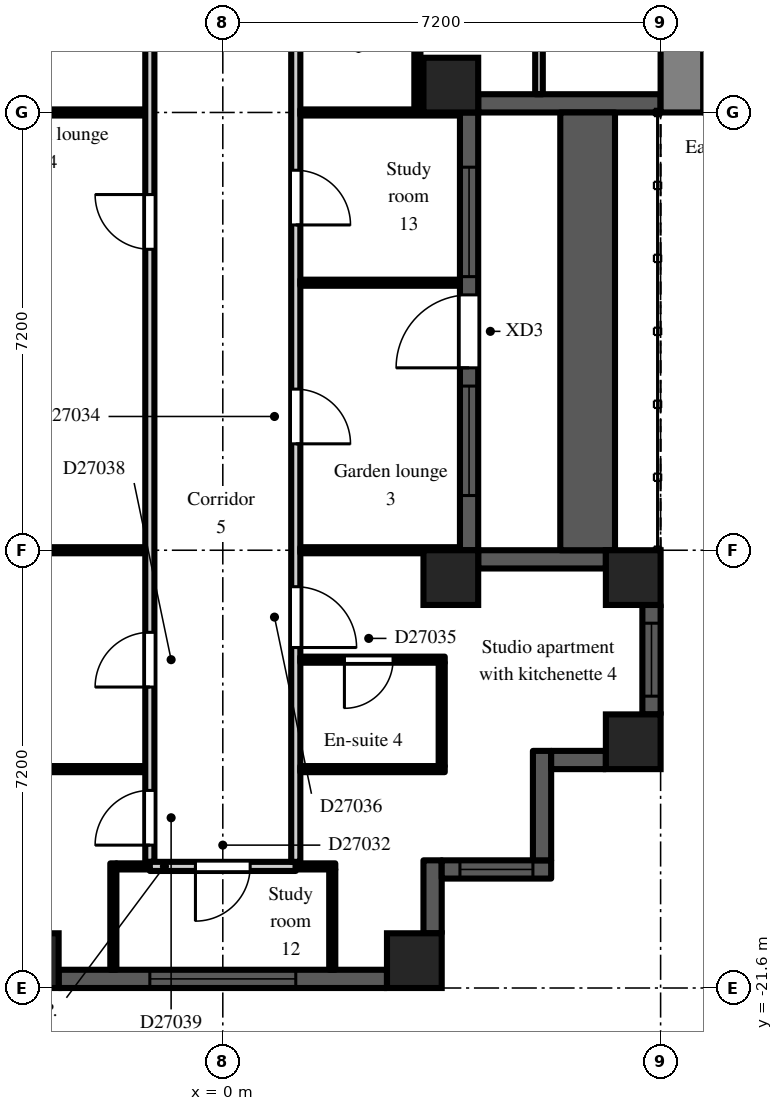
"""IFC4 building model, lengths in metres.
Left out: names, types, materials, properties, quantities, classifications, styles, units other than length and angle.
Written with IfcOpenShell. Run it as: python <this file> out.ifc"""

import sys

from ifc_helpers import new_model, si_unit, direction, frame, frame_2d, origin, origin_2d, place, context, subcontext, project, spatial, rectangle, extrude, element, fill, save


model = new_model("IFC4")
c1 = context("Model", 3, precision=1e-05, world=origin(), true_north=direction((0.0, 1.0)))
c2 = subcontext(c1, "Body", "Model", "MODEL_VIEW")
j1 = project(units=[si_unit("LENGTHUNIT", "METRE"), si_unit("PLANEANGLEUNIT", "RADIAN")], contexts=[c1])
p1 = place(None, origin())
s1 = spatial("IfcSite", under=j1, at=p1, CompositionType="ELEMENT")
p2 = place(p1, origin())
s2 = spatial("IfcBuilding", under=s1, at=p2, CompositionType="ELEMENT")
p3 = place(p2, frame((0.0, 0.0, 191.7)))
s3 = spatial("IfcBuildingStorey", under=s2, at=p3, CompositionType="ELEMENT", Elevation=191.7)
for number, where, z_axis, x_axis in (
    (1, (-3.15, -21.15, 0.0), (0.0, 0.0, 1.0), (1.0, 0.0, 0.0)),
    (2, (3.15, -21.15, 0.0), (0.0, 0.0, 1.0), (1.0, 0.0, 0.0)),
    (3, (3.75, -14.85, 0.0), (0.0, 0.0, 1.0), (1.0, 0.0, 0.0)),
    (4, (3.75, -6.75, 0.0), (0.0, 0.0, 1.0), (1.0, 0.0, 0.0)),
    (5, (6.75, -17.55, 0.0), (0.0, 0.0, 1.0), (1.0, 0.0, 0.0)),
    (6, (6.75, -14.85, 0.0), (0.0, 0.0, 1.0), (1.0, 0.0, 0.0)),
):
    element("IfcColumn", number, at=place(p3, frame(where, z_axis=z_axis, x_axis=x_axis)), inside=s3, PredefinedType="COLUMN", context=c2, shape_type="SweptSolid", body=[
        extrude(rectangle(XDim=0.9, YDim=0.9, at=origin_2d()), origin(), (0.0, 0.0, 1.0), 3.0),
    ])
p4 = place(p3, frame((-2.7, -21.45, 0.0), z_axis=(0.0, 0.0, 1.0), x_axis=(1.0, 0.0, 0.0)))
e7 = element("IfcWall", 7, at=p4, inside=s3, PredefinedType="SOLIDWALL", context=c2, shape_type="SweptSolid", body=[
    extrude(rectangle(XDim=5.4, YDim=0.3, at=frame_2d((2.7, 0.0))), origin(), (0.0, 0.0, 1.0), 2.3),
])
p5 = place(p4, frame((1.5, 0.0, 0.2)))
e8 = element("IfcOpeningElement", 8, at=p5, cuts=e7, PredefinedType="OPENING", context=c2, shape_type="SweptSolid", body=[
    extrude(rectangle(XDim=2.4, YDim=1.85, at=frame_2d((1.2, 0.925))), frame((0.0, 0.16, 0.0), z_axis=(0.0, -1.0, 0.0), x_axis=(1.0, 0.0, 0.0)), (0.0, 0.0, 1.0), 0.32),
])
p6 = place(p3, frame((3.45, -20.7, 0.0), z_axis=(0.0, 0.0, 1.0), x_axis=(0.0, 1.0, 0.0)))
e9 = element("IfcWall", 9, at=p6, inside=s3, PredefinedType="SOLIDWALL", context=c2, shape_type="SweptSolid", body=[
    extrude(rectangle(XDim=1.2, YDim=0.3, at=frame_2d((0.6, 0.0))), origin(), (0.0, 0.0, 1.0), 2.55),
])
p7 = place(p3, frame((3.6, -19.65, 0.0), z_axis=(0.0, 0.0, 1.0), x_axis=(1.0, 0.0, 0.0)))
e10 = element("IfcWall", 10, at=p7, inside=s3, PredefinedType="SOLIDWALL", context=c2, shape_type="SweptSolid", body=[
    extrude(rectangle(XDim=1.8, YDim=0.3, at=frame_2d((0.9, 0.0))), origin(), (0.0, 0.0, 1.0), 2.55),
])
p8 = place(p7, frame((0.3, 0.0, 0.2)))
e11 = element("IfcOpeningElement", 11, at=p8, cuts=e10, PredefinedType="OPENING", context=c2, shape_type="SweptSolid", body=[
    extrude(rectangle(XDim=1.2, YDim=1.85, at=frame_2d((0.6, 0.925))), frame((0.0, 0.16, 0.0), z_axis=(0.0, -1.0, 0.0), x_axis=(1.0, 0.0, 0.0)), (0.0, 0.0, 1.0), 0.32),
])
p9 = place(p3, frame((5.25, -19.5, 0.0), z_axis=(0.0, 0.0, 1.0), x_axis=(0.0, 1.0, 0.0)))
e12 = element("IfcWall", 12, at=p9, inside=s3, PredefinedType="SOLIDWALL", context=c2, shape_type="SweptSolid", body=[
    extrude(rectangle(XDim=1.8, YDim=0.3, at=frame_2d((0.9, 0.0))), origin(), (0.0, 0.0, 1.0), 2.55),
])
p10 = place(p3, frame((5.4, -17.85, 0.0), z_axis=(0.0, 0.0, 1.0), x_axis=(1.0, 0.0, 0.0)))
e13 = element("IfcWall", 13, at=p10, inside=s3, PredefinedType="SOLIDWALL", context=c2, shape_type="SweptSolid", body=[
    extrude(rectangle(XDim=0.9, YDim=0.3, at=frame_2d((0.45, 0.0))), origin(), (0.0, 0.0, 1.0), 2.55),
])
p11 = place(p3, frame((7.05, -17.1, 0.0), z_axis=(0.0, 0.0, 1.0), x_axis=(0.0, 1.0, 0.0)))
e14 = element("IfcWall", 14, at=p11, inside=s3, PredefinedType="SOLIDWALL", context=c2, shape_type="SweptSolid", body=[
    extrude(rectangle(XDim=1.8, YDim=0.3, at=frame_2d((0.9, 0.0))), origin(), (0.0, 0.0, 1.0), 2.3),
])
p12 = place(p11, frame((0.3, 0.0, 0.2)))
e15 = element("IfcOpeningElement", 15, at=p12, cuts=e14, PredefinedType="OPENING", context=c2, shape_type="SweptSolid", body=[
    extrude(rectangle(XDim=1.2, YDim=1.85, at=frame_2d((0.6, 0.925))), frame((0.0, 0.16, 0.0), z_axis=(0.0, -1.0, 0.0), x_axis=(1.0, 0.0, 0.0)), (0.0, 0.0, 1.0), 0.32),
])
p13 = place(p3, frame((6.3, -14.55, 0.0), z_axis=(0.0, 0.0, 1.0), x_axis=(-1.0, 0.0, 0.0)))
e16 = element("IfcWall", 16, at=p13, inside=s3, PredefinedType="SOLIDWALL", context=c2, shape_type="SweptSolid", body=[
    extrude(rectangle(XDim=2.1, YDim=0.3, at=frame_2d((1.05, 0.0))), origin(), (0.0, 0.0, 1.0), 2.55),
])
p14 = place(p3, frame((4.05, -14.4, 0.0), z_axis=(0.0, 0.0, 1.0), x_axis=(0.0, 1.0, 0.0)))
e17 = element("IfcWall", 17, at=p14, inside=s3, PredefinedType="SOLIDWALL", context=c2, shape_type="SweptSolid", body=[
    extrude(rectangle(XDim=7.2, YDim=0.3, at=frame_2d((3.6, 0.0))), origin(), (0.0, 0.0, 1.0), 2.55),
])
p15 = place(p14, frame((3.0, 0.0, 0.0)))
e18 = element("IfcOpeningElement", 18, at=p15, cuts=e17, PredefinedType="OPENING", context=c2, shape_type="SweptSolid", body=[
    extrude(rectangle(XDim=1.2, YDim=2.05, at=frame_2d((0.6, 1.025))), frame((0.0, 0.16, 0.0), z_axis=(0.0, -1.0, 0.0), x_axis=(1.0, 0.0, 0.0)), (0.0, 0.0, 1.0), 0.32),
])
p16 = place(p14, frame((0.9, 0.0, 0.2)))
e19 = element("IfcOpeningElement", 19, at=p16, cuts=e17, PredefinedType="OPENING", context=c2, shape_type="SweptSolid", body=[
    extrude(rectangle(XDim=1.8, YDim=1.85, at=frame_2d((0.9, 0.925))), frame((0.0, 0.16, 0.0), z_axis=(0.0, -1.0, 0.0), x_axis=(1.0, 0.0, 0.0)), (0.0, 0.0, 1.0), 0.32),
])
p17 = place(p14, frame((4.5, 0.0, 0.2)))
e20 = element("IfcOpeningElement", 20, at=p17, cuts=e17, PredefinedType="OPENING", context=c2, shape_type="SweptSolid", body=[
    extrude(rectangle(XDim=1.8, YDim=1.85, at=frame_2d((0.9, 0.925))), frame((0.0, 0.16, 0.0), z_axis=(0.0, -1.0, 0.0), x_axis=(1.0, 0.0, 0.0)), (0.0, 0.0, 1.0), 0.32),
])
p18 = place(p3, frame((4.2, -7.05, 0.0), z_axis=(0.0, 0.0, 1.0), x_axis=(1.0, 0.0, 0.0)))
e21 = element("IfcWall", 21, at=p18, inside=s3, PredefinedType="SOLIDWALL", context=c2, shape_type="SweptSolid", body=[
    extrude(rectangle(XDim=3.0, YDim=0.3, at=frame_2d((1.5, 0.0))), origin(), (0.0, 0.0, 1.0), 2.55),
])
p19 = place(p3, frame((6.0, -14.4, 0.0), z_axis=(0.0, 0.0, 1.0), x_axis=(0.0, 1.0, 0.0)))
e22 = element("IfcWall", 22, at=p19, inside=s3, PredefinedType="PARAPET", context=c2, shape_type="SweptSolid", body=[
    extrude(rectangle(XDim=7.2, YDim=0.9, at=frame_2d((3.6, 0.0))), origin(), (0.0, 0.0, 1.0), 0.8),
])
p20 = place(p3, frame((7.55, -7.2, 0.0), z_axis=(0.0, 0.0, 1.0), x_axis=(0.0, 1.0, 0.0)))
e23 = element("IfcWall", 23, at=p20, inside=s3, PredefinedType="SHEAR", context=c2, shape_type="SweptSolid", body=[
    extrude(rectangle(XDim=14.4, YDim=0.7, at=frame_2d((7.2, 0.0))), origin(), (0.0, 0.0, 1.0), 2.55),
])
p21 = place(p20, frame((6.0, 0.0, 0.0)))
e24 = element("IfcOpeningElement", 24, at=p21, cuts=e23, PredefinedType="OPENING", context=c2, shape_type="SweptSolid", body=[
    extrude(rectangle(XDim=2.4, YDim=2.2, at=frame_2d((1.2, 1.1))), frame((0.0, 0.36, 0.0), z_axis=(0.0, -1.0, 0.0), x_axis=(1.0, 0.0, 0.0)), (0.0, 0.0, 1.0), 0.72),
])
p22 = place(p3, frame((-5.1, -18.0, 0.0), z_axis=(0.0, 0.0, 1.0), x_axis=(1.0, 0.0, 0.0)))
e25 = element("IfcWall", 25, at=p22, inside=s3, PredefinedType="PARTITIONING", context=c2, shape_type="SweptSolid", body=[
    extrude(rectangle(XDim=3.825, YDim=0.1, at=frame_2d((1.913, 0.0))), origin(), (0.0, 0.0, 1.0), 2.55),
])
for number, where, z_axis, x_axis in (
    (26, (-3.9, -14.4, 0.0), (0.0, 0.0, 1.0), (1.0, 0.0, 0.0)),
    (27, (-3.9, -7.2, 0.0), (0.0, 0.0, 1.0), (1.0, 0.0, 0.0)),
):
    element("IfcWall", number, at=place(p3, frame(where, z_axis=z_axis, x_axis=x_axis)), inside=s3, PredefinedType="PARTITIONING", context=c2, shape_type="SweptSolid", body=[
        extrude(rectangle(XDim=2.625, YDim=0.1, at=frame_2d((1.312, 0.0))), origin(), (0.0, 0.0, 1.0), 2.55),
    ])
p23 = place(p3, frame((-1.8, -21.3, 0.0), z_axis=(0.0, 0.0, 1.0), x_axis=(0.0, 1.0, 0.0)))
e28 = element("IfcWall", 28, at=p23, inside=s3, PredefinedType="PARTITIONING", context=c2, shape_type="SweptSolid", body=[
    extrude(rectangle(XDim=1.75, YDim=0.1, at=frame_2d((0.875, 0.0))), origin(), (0.0, 0.0, 1.0), 2.55),
])
p24 = place(p3, frame((-1.75, -19.6, 0.0), z_axis=(0.0, 0.0, 1.0), x_axis=(1.0, 0.0, 0.0)))
e29 = element("IfcWall", 29, at=p24, inside=s3, PredefinedType="PARTITIONING", context=c2, shape_type="SweptSolid", body=[
    extrude(rectangle(XDim=0.55, YDim=0.1, at=frame_2d((0.275, 0.0))), origin(), (0.0, 0.0, 1.0), 2.55),
])
p25 = place(p3, frame((-1.2, -19.525, 0.0), z_axis=(0.0, 0.0, 1.0), x_axis=(0.0, 1.0, 0.0)))
e30 = element("IfcWall", 30, at=p25, inside=s3, PredefinedType="PARTITIONING", context=c2, shape_type="SweptSolid", body=[
    extrude(rectangle(XDim=18.25, YDim=0.15, at=frame_2d((9.125, 0.0))), origin(), (0.0, 0.0, 1.0), 2.55),
])
p26 = place(p25, frame((10.075, 0.0, 0.0)))
e31 = element("IfcOpeningElement", 31, at=p26, cuts=e30, PredefinedType="OPENING", context=c2, shape_type="SweptSolid", body=[
    extrude(rectangle(XDim=0.9, YDim=2.1, at=frame_2d((0.45, 1.05))), frame((0.0, 0.085, 0.0), z_axis=(0.0, -1.0, 0.0), x_axis=(1.0, 0.0, 0.0)), (0.0, 0.0, 1.0), 0.17),
])
p27 = place(p25, frame((2.875, 0.0, 0.0)))
e32 = element("IfcOpeningElement", 32, at=p27, cuts=e30, PredefinedType="OPENING", context=c2, shape_type="SweptSolid", body=[
    extrude(rectangle(XDim=0.9, YDim=2.1, at=frame_2d((0.45, 1.05))), frame((0.0, 0.085, 0.0), z_axis=(0.0, -1.0, 0.0), x_axis=(1.0, 0.0, 0.0)), (0.0, 0.0, 1.0), 0.17),
])
p28 = place(p25, frame((0.275, 0.0, 0.0)))
e33 = element("IfcOpeningElement", 33, at=p28, cuts=e30, PredefinedType="OPENING", context=c2, shape_type="SweptSolid", body=[
    extrude(rectangle(XDim=0.9, YDim=2.1, at=frame_2d((0.45, 1.05))), frame((0.0, 0.085, 0.0), z_axis=(0.0, -1.0, 0.0), x_axis=(1.0, 0.0, 0.0)), (0.0, 0.0, 1.0), 0.17),
])
p29 = place(p3, frame((-1.2, -19.6, 0.0), z_axis=(0.0, 0.0, 1.0), x_axis=(1.0, 0.0, 0.0)))
e34 = element("IfcWall", 34, at=p29, inside=s3, PredefinedType="PARTITIONING", context=c2, shape_type="SweptSolid", body=[
    extrude(rectangle(XDim=2.4, YDim=0.15, at=frame_2d((1.2, 0.0))), origin(), (0.0, 0.0, 1.0), 2.55),
])
p30 = place(p29, frame((0.75, 0.0, 0.0)))
e35 = element("IfcOpeningElement", 35, at=p30, cuts=e34, PredefinedType="OPENING", context=c2, shape_type="SweptSolid", body=[
    extrude(rectangle(XDim=0.9, YDim=2.1, at=frame_2d((0.45, 1.05))), frame((0.0, 0.085, 0.0), z_axis=(0.0, -1.0, 0.0), x_axis=(1.0, 0.0, 0.0)), (0.0, 0.0, 1.0), 0.17),
])
p31 = place(p3, frame((1.2, -19.525, 0.0), z_axis=(0.0, 0.0, 1.0), x_axis=(0.0, 1.0, 0.0)))
e36 = element("IfcWall", 36, at=p31, inside=s3, PredefinedType="PARTITIONING", context=c2, shape_type="SweptSolid", body=[
    extrude(rectangle(XDim=18.4, YDim=0.15, at=frame_2d((9.2, 0.0))), origin(), (0.0, 0.0, 1.0), 2.55),
])
p32 = place(p31, frame((14.875, 0.0, 0.0)))
e37 = element("IfcOpeningElement", 37, at=p32, cuts=e36, PredefinedType="OPENING", context=c2, shape_type="SweptSolid", body=[
    extrude(rectangle(XDim=0.9, YDim=2.1, at=frame_2d((0.45, 1.05))), frame((0.0, 0.085, 0.0), z_axis=(0.0, -1.0, 0.0), x_axis=(1.0, 0.0, 0.0)), (0.0, 0.0, 1.0), 0.17),
])
p33 = place(p31, frame((10.475, 0.0, 0.0)))
e38 = element("IfcOpeningElement", 38, at=p33, cuts=e36, PredefinedType="OPENING", context=c2, shape_type="SweptSolid", body=[
    extrude(rectangle(XDim=0.9, YDim=2.1, at=frame_2d((0.45, 1.05))), frame((0.0, 0.085, 0.0), z_axis=(0.0, -1.0, 0.0), x_axis=(1.0, 0.0, 0.0)), (0.0, 0.0, 1.0), 0.17),
])
p34 = place(p31, frame((6.875, 0.0, 0.0)))
e39 = element("IfcOpeningElement", 39, at=p34, cuts=e36, PredefinedType="OPENING", context=c2, shape_type="SweptSolid", body=[
    extrude(rectangle(XDim=0.9, YDim=2.1, at=frame_2d((0.45, 1.05))), frame((0.0, 0.085, 0.0), z_axis=(0.0, -1.0, 0.0), x_axis=(1.0, 0.0, 0.0)), (0.0, 0.0, 1.0), 0.17),
])
p35 = place(p31, frame((3.525, 0.0, 0.0)))
e40 = element("IfcOpeningElement", 40, at=p35, cuts=e36, PredefinedType="OPENING", context=c2, shape_type="SweptSolid", body=[
    extrude(rectangle(XDim=1.0, YDim=2.1, at=frame_2d((0.5, 1.05))), frame((0.0, 0.085, 0.0), z_axis=(0.0, -1.0, 0.0), x_axis=(1.0, 0.0, 0.0)), (0.0, 0.0, 1.0), 0.17),
])
p36 = place(p3, frame((1.2, -19.6, 0.0), z_axis=(0.0, 0.0, 1.0), x_axis=(1.0, 0.0, 0.0)))
e41 = element("IfcWall", 41, at=p36, inside=s3, PredefinedType="PARTITIONING", context=c2, shape_type="SweptSolid", body=[
    extrude(rectangle(XDim=0.65, YDim=0.1, at=frame_2d((0.325, 0.0))), origin(), (0.0, 0.0, 1.0), 2.55),
])
p37 = place(p3, frame((1.275, -18.0, 0.0), z_axis=(0.0, 0.0, 1.0), x_axis=(1.0, 0.0, 0.0)))
e42 = element("IfcWall", 42, at=p37, inside=s3, PredefinedType="PARTITIONING", context=c2, shape_type="SweptSolid", body=[
    extrude(rectangle(XDim=2.375, YDim=0.1, at=frame_2d((1.188, 0.0))), origin(), (0.0, 0.0, 1.0), 2.55),
])
p38 = place(p3, frame((1.275, -16.2, 0.0), z_axis=(0.0, 0.0, 1.0), x_axis=(1.0, 0.0, 0.0)))
e43 = element("IfcWall", 43, at=p38, inside=s3, PredefinedType="PARTITIONING", context=c2, shape_type="SweptSolid", body=[
    extrude(rectangle(XDim=2.375, YDim=0.1, at=frame_2d((1.188, 0.0))), origin(), (0.0, 0.0, 1.0), 2.55),
])
p39 = place(p38, frame((0.725, 0.0, 0.0)))
e44 = element("IfcOpeningElement", 44, at=p39, cuts=e43, PredefinedType="OPENING", context=c2, shape_type="SweptSolid", body=[
    extrude(rectangle(XDim=0.8, YDim=2.1, at=frame_2d((0.4, 1.05))), frame((0.0, 0.06, 0.0), z_axis=(0.0, -1.0, 0.0), x_axis=(1.0, 0.0, 0.0)), (0.0, 0.0, 1.0), 0.12),
])
for number, where, z_axis, x_axis in (
    (45, (1.275, -14.4, 0.0), (0.0, 0.0, 1.0), (1.0, 0.0, 0.0)),
    (46, (1.275, -10.0, 0.0), (0.0, 0.0, 1.0), (1.0, 0.0, 0.0)),
    (47, (1.275, -7.2, 0.0), (0.0, 0.0, 1.0), (1.0, 0.0, 0.0)),
):
    element("IfcWall", number, at=place(p3, frame(where, z_axis=z_axis, x_axis=x_axis)), inside=s3, PredefinedType="PARTITIONING", context=c2, shape_type="SweptSolid", body=[
        extrude(rectangle(XDim=2.625, YDim=0.1, at=frame_2d((1.312, 0.0))), origin(), (0.0, 0.0, 1.0), 2.55),
    ])
p40 = place(p3, frame((1.8, -21.3, 0.0), z_axis=(0.0, 0.0, 1.0), x_axis=(0.0, 1.0, 0.0)))
e48 = element("IfcWall", 48, at=p40, inside=s3, PredefinedType="PARTITIONING", context=c2, shape_type="SweptSolid", body=[
    extrude(rectangle(XDim=1.65, YDim=0.1, at=frame_2d((0.825, 0.0))), origin(), (0.0, 0.0, 1.0), 2.55),
])
p41 = place(p3, frame((3.2, -7.15, 0.0), z_axis=(0.0, 0.0, 1.0), x_axis=(0.0, 1.0, 0.0)))
e49 = element("IfcWall", 49, at=p41, inside=s3, PredefinedType="PARTITIONING", context=c2, shape_type="SweptSolid", body=[
    extrude(rectangle(XDim=5.875, YDim=0.1, at=frame_2d((2.938, 0.0))), origin(), (0.0, 0.0, 1.0), 2.55),
])
p42 = place(p3, frame((3.6, -17.95, 0.0), z_axis=(0.0, 0.0, 1.0), x_axis=(0.0, 1.0, 0.0)))
e50 = element("IfcWall", 50, at=p42, inside=s3, PredefinedType="PARTITIONING", context=c2, shape_type="SweptSolid", body=[
    extrude(rectangle(XDim=1.7, YDim=0.1, at=frame_2d((0.85, 0.0))), origin(), (0.0, 0.0, 1.0), 2.55),
])
p43 = place(p3, frame((5.2, -6.9, 0.0), z_axis=(0.0, 0.0, 1.0), x_axis=(0.0, 1.0, 0.0)))
e51 = element("IfcWall", 51, at=p43, inside=s3, PredefinedType="PARTITIONING", context=c2, shape_type="SweptSolid", body=[
    extrude(rectangle(XDim=5.625, YDim=0.125, at=frame_2d((2.812, 0.0))), origin(), (0.0, 0.0, 1.0), 2.55),
])
p44 = place(p5, origin())
e52 = element("IfcWindow", 52, at=p44, inside=s3, PartitioningType="SINGLE_PANEL", PredefinedType="WINDOW", context=c2, shape_type="SweptSolid", body=[
    extrude(rectangle(XDim=2.4, YDim=1.85, at=frame_2d((1.2, 0.925))), frame((0.0, 0.03, 0.0), z_axis=(0.0, -1.0, 0.0), x_axis=(1.0, 0.0, 0.0)), (0.0, 0.0, 1.0), 0.06),
])
fill(e8, e52)
p45 = place(p8, origin())
e53 = element("IfcWindow", 53, at=p45, inside=s3, PartitioningType="SINGLE_PANEL", PredefinedType="WINDOW", context=c2, shape_type="SweptSolid", body=[
    extrude(rectangle(XDim=1.2, YDim=1.85, at=frame_2d((0.6, 0.925))), frame((0.0, 0.03, 0.0), z_axis=(0.0, -1.0, 0.0), x_axis=(1.0, 0.0, 0.0)), (0.0, 0.0, 1.0), 0.06),
])
fill(e11, e53)
p46 = place(p12, origin())
e54 = element("IfcWindow", 54, at=p46, inside=s3, PartitioningType="SINGLE_PANEL", PredefinedType="WINDOW", context=c2, shape_type="SweptSolid", body=[
    extrude(rectangle(XDim=1.2, YDim=1.85, at=frame_2d((0.6, 0.925))), frame((0.0, 0.03, 0.0), z_axis=(0.0, -1.0, 0.0), x_axis=(1.0, 0.0, 0.0)), (0.0, 0.0, 1.0), 0.06),
])
fill(e15, e54)
p47 = place(p15, origin())
e55 = element("IfcDoor", 55, at=p47, inside=s3, OperationType="SINGLE_SWING_LEFT", PredefinedType="DOOR", context=c2, shape_type="SweptSolid", body=[
    extrude(rectangle(XDim=1.2, YDim=2.05, at=frame_2d((0.6, 1.025))), frame((0.0, 0.025, 0.0), z_axis=(0.0, -1.0, 0.0), x_axis=(1.0, 0.0, 0.0)), (0.0, 0.0, 1.0), 0.05),
])
fill(e18, e55)
p48 = place(p16, origin())
e56 = element("IfcWindow", 56, at=p48, inside=s3, PartitioningType="SINGLE_PANEL", PredefinedType="WINDOW", context=c2, shape_type="SweptSolid", body=[
    extrude(rectangle(XDim=1.8, YDim=1.85, at=frame_2d((0.9, 0.925))), frame((0.0, 0.03, 0.0), z_axis=(0.0, -1.0, 0.0), x_axis=(1.0, 0.0, 0.0)), (0.0, 0.0, 1.0), 0.06),
])
fill(e19, e56)
p49 = place(p17, origin())
e57 = element("IfcWindow", 57, at=p49, inside=s3, PartitioningType="SINGLE_PANEL", PredefinedType="WINDOW", context=c2, shape_type="SweptSolid", body=[
    extrude(rectangle(XDim=1.8, YDim=1.85, at=frame_2d((0.9, 0.925))), frame((0.0, 0.03, 0.0), z_axis=(0.0, -1.0, 0.0), x_axis=(1.0, 0.0, 0.0)), (0.0, 0.0, 1.0), 0.06),
])
fill(e20, e57)
p50 = place(p30, frame((0.9, 0.0, 0.0), z_axis=(0.0, 0.0, 1.0), x_axis=(-1.0, 0.0, 0.0)))
e58 = element("IfcDoor", 58, at=p50, inside=s3, OperationType="SINGLE_SWING_RIGHT", PredefinedType="DOOR", context=c2, shape_type="SweptSolid", body=[
    extrude(rectangle(XDim=0.9, YDim=2.1, at=frame_2d((0.45, 1.05))), frame((0.0, 0.025, 0.0), z_axis=(0.0, -1.0, 0.0), x_axis=(1.0, 0.0, 0.0)), (0.0, 0.0, 1.0), 0.05),
])
fill(e35, e58)
p51 = place(p33, frame((0.9, 0.0, 0.0), z_axis=(0.0, 0.0, 1.0), x_axis=(-1.0, 0.0, 0.0)))
e59 = element("IfcDoor", 59, at=p51, inside=s3, OperationType="SINGLE_SWING_RIGHT", PredefinedType="DOOR", context=c2, shape_type="SweptSolid", body=[
    extrude(rectangle(XDim=0.9, YDim=2.1, at=frame_2d((0.45, 1.05))), frame((0.0, 0.025, 0.0), z_axis=(0.0, -1.0, 0.0), x_axis=(1.0, 0.0, 0.0)), (0.0, 0.0, 1.0), 0.05),
])
fill(e38, e59)
p52 = place(p34, frame((0.9, 0.0, 0.0), z_axis=(0.0, 0.0, 1.0), x_axis=(-1.0, 0.0, 0.0)))
e60 = element("IfcDoor", 60, at=p52, inside=s3, OperationType="SINGLE_SWING_RIGHT", PredefinedType="DOOR", context=c2, shape_type="SweptSolid", body=[
    extrude(rectangle(XDim=0.9, YDim=2.1, at=frame_2d((0.45, 1.05))), frame((0.0, 0.025, 0.0), z_axis=(0.0, -1.0, 0.0), x_axis=(1.0, 0.0, 0.0)), (0.0, 0.0, 1.0), 0.05),
])
fill(e39, e60)
p53 = place(p39, frame((0.8, 0.0, 0.0), z_axis=(0.0, 0.0, 1.0), x_axis=(-1.0, 0.0, 0.0)))
e61 = element("IfcDoor", 61, at=p53, inside=s3, OperationType="SINGLE_SWING_RIGHT", PredefinedType="DOOR", context=c2, shape_type="SweptSolid", body=[
    extrude(rectangle(XDim=0.8, YDim=2.1, at=frame_2d((0.4, 1.05))), frame((0.0, 0.025, 0.0), z_axis=(0.0, -1.0, 0.0), x_axis=(1.0, 0.0, 0.0)), (0.0, 0.0, 1.0), 0.05),
])
fill(e44, e61)
p54 = place(p35, frame((1.0, 0.0, 0.0), z_axis=(0.0, 0.0, 1.0), x_axis=(-1.0, 0.0, 0.0)))
e62 = element("IfcDoor", 62, at=p54, inside=s3, OperationType="SINGLE_SWING_RIGHT", PredefinedType="DOOR", context=c2, shape_type="SweptSolid", body=[
    extrude(rectangle(XDim=1.0, YDim=2.1, at=frame_2d((0.5, 1.05))), frame((0.0, 0.025, 0.0), z_axis=(0.0, -1.0, 0.0), x_axis=(1.0, 0.0, 0.0)), (0.0, 0.0, 1.0), 0.05),
])
fill(e40, e62)
p55 = place(p26, origin())
e63 = element("IfcDoor", 63, at=p55, inside=s3, OperationType="SINGLE_SWING_RIGHT", PredefinedType="DOOR", context=c2, shape_type="SweptSolid", body=[
    extrude(rectangle(XDim=0.9, YDim=2.1, at=frame_2d((0.45, 1.05))), frame((0.0, 0.025, 0.0), z_axis=(0.0, -1.0, 0.0), x_axis=(1.0, 0.0, 0.0)), (0.0, 0.0, 1.0), 0.05),
])
fill(e31, e63)
p56 = place(p27, origin())
e64 = element("IfcDoor", 64, at=p56, inside=s3, OperationType="SINGLE_SWING_LEFT", PredefinedType="DOOR", context=c2, shape_type="SweptSolid", body=[
    extrude(rectangle(XDim=0.9, YDim=2.1, at=frame_2d((0.45, 1.05))), frame((0.0, 0.025, 0.0), z_axis=(0.0, -1.0, 0.0), x_axis=(1.0, 0.0, 0.0)), (0.0, 0.0, 1.0), 0.05),
])
fill(e32, e64)
p57 = place(p28, origin())
e65 = element("IfcDoor", 65, at=p57, inside=s3, OperationType="SINGLE_SWING_LEFT", PredefinedType="DOOR", context=c2, shape_type="SweptSolid", body=[
    extrude(rectangle(XDim=0.9, YDim=2.1, at=frame_2d((0.45, 1.05))), frame((0.0, 0.025, 0.0), z_axis=(0.0, -1.0, 0.0), x_axis=(1.0, 0.0, 0.0)), (0.0, 0.0, 1.0), 0.05),
])
fill(e33, e65)
save(model, sys.argv[1])
